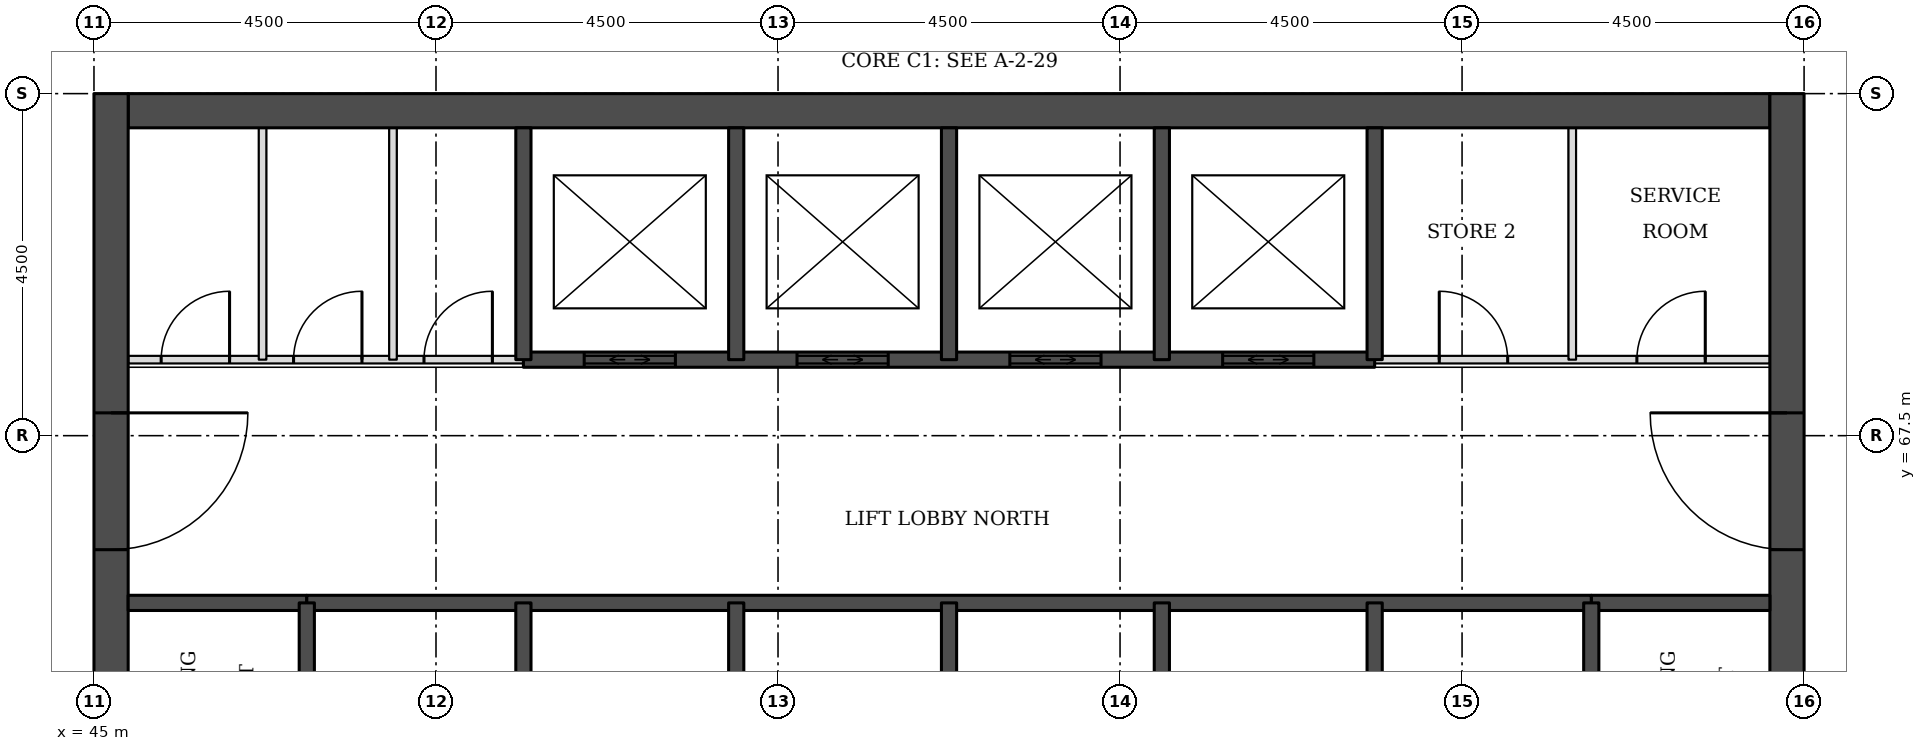
"""IFC4 building model, lengths in metres.
Left out: names, types, materials, properties, quantities, classifications, styles, units other than length and angle.
Written with IfcOpenShell. Run it as: python <this file> out.ifc"""

import sys

from ifc_helpers import new_model, si_unit, direction, frame, frame_2d, origin, place, context, subcontext, project, spatial, rectangle, extrude, element, fill, save


model = new_model("IFC4")
c1 = context("Model", 3, precision=1e-05, world=origin(), true_north=direction((0.0, 1.0)))
c2 = subcontext(c1, "Body", "Model", "MODEL_VIEW")
j1 = project(units=[si_unit("LENGTHUNIT", "METRE"), si_unit("PLANEANGLEUNIT", "RADIAN")], contexts=[c1])
p1 = place(None, origin())
s1 = spatial("IfcSite", under=j1, at=p1, CompositionType="ELEMENT")
p2 = place(p1, origin())
s2 = spatial("IfcBuilding", under=s1, at=p2, CompositionType="ELEMENT")
p3 = place(p2, frame((0.0, 0.0, 108.5)))
s3 = spatial("IfcBuildingStorey", under=s2, at=p3, CompositionType="ELEMENT", Elevation=108.5)
p4 = place(p3, frame((45.45, 71.775, 0.0), z_axis=(0.0, 0.0, 1.0), x_axis=(1.0, 0.0, 0.0)))
e1 = element("IfcWall", 1, at=p4, inside=s3, PredefinedType="SHEAR", context=c2, shape_type="SweptSolid", body=[
    extrude(rectangle(XDim=21.6, YDim=0.45, at=frame_2d((10.8, 0.0))), origin(), (0.0, 0.0, 1.0), 3.7),
])
p5 = place(p3, frame((45.225, 49.5, 0.0), z_axis=(0.0, 0.0, 1.0), x_axis=(0.0, 1.0, 0.0)))
e2 = element("IfcWall", 2, at=p5, inside=s3, PredefinedType="SHEAR", context=c2, shape_type="SweptSolid", body=[
    extrude(rectangle(XDim=22.5, YDim=0.45, at=frame_2d((11.25, 0.0))), origin(), (0.0, 0.0, 1.0), 3.7),
])
p6 = place(p5, frame((4.2, 0.0, 0.0)))
e3 = element("IfcOpeningElement", 3, at=p6, cuts=e2, PredefinedType="OPENING", context=c2, shape_type="SweptSolid", body=[
    extrude(rectangle(XDim=1.8, YDim=2.1, at=frame_2d((0.9, 1.05))), frame((0.0, 0.235, 0.0), z_axis=(0.0, -1.0, 0.0), x_axis=(1.0, 0.0, 0.0)), (0.0, 0.0, 1.0), 0.47),
])
p7 = place(p5, frame((6.9, 0.0, 0.0)))
e4 = element("IfcOpeningElement", 4, at=p7, cuts=e2, PredefinedType="OPENING", context=c2, shape_type="SweptSolid", body=[
    extrude(rectangle(XDim=1.1, YDim=2.1, at=frame_2d((0.55, 1.05))), frame((0.0, 0.235, 0.0), z_axis=(0.0, -1.0, 0.0), x_axis=(1.0, 0.0, 0.0)), (0.0, 0.0, 1.0), 0.47),
])
p8 = place(p5, frame((13.6, 0.0, 0.0)))
e5 = element("IfcOpeningElement", 5, at=p8, cuts=e2, PredefinedType="OPENING", context=c2, shape_type="SweptSolid", body=[
    extrude(rectangle(XDim=1.1, YDim=2.1, at=frame_2d((0.55, 1.05))), frame((0.0, 0.235, 0.0), z_axis=(0.0, -1.0, 0.0), x_axis=(1.0, 0.0, 0.0)), (0.0, 0.0, 1.0), 0.47),
])
p9 = place(p5, frame((16.5, 0.0, 0.0)))
e6 = element("IfcOpeningElement", 6, at=p9, cuts=e2, PredefinedType="OPENING", context=c2, shape_type="SweptSolid", body=[
    extrude(rectangle(XDim=1.8, YDim=2.1, at=frame_2d((0.9, 1.05))), frame((0.0, 0.235, 0.0), z_axis=(0.0, -1.0, 0.0), x_axis=(1.0, 0.0, 0.0)), (0.0, 0.0, 1.0), 0.47),
])
p10 = place(p3, frame((67.275, 49.5, 0.0), z_axis=(0.0, 0.0, 1.0), x_axis=(0.0, 1.0, 0.0)))
e7 = element("IfcWall", 7, at=p10, inside=s3, PredefinedType="SHEAR", context=c2, shape_type="SweptSolid", body=[
    extrude(rectangle(XDim=22.5, YDim=0.45, at=frame_2d((11.25, 0.0))), origin(), (0.0, 0.0, 1.0), 3.7),
])
p11 = place(p10, frame((4.2, 0.0, 0.0)))
e8 = element("IfcOpeningElement", 8, at=p11, cuts=e7, PredefinedType="OPENING", context=c2, shape_type="SweptSolid", body=[
    extrude(rectangle(XDim=1.8, YDim=2.1, at=frame_2d((0.9, 1.05))), frame((0.0, 0.235, 0.0), z_axis=(0.0, -1.0, 0.0), x_axis=(1.0, 0.0, 0.0)), (0.0, 0.0, 1.0), 0.47),
])
p12 = place(p10, frame((6.9, 0.0, 0.0)))
e9 = element("IfcOpeningElement", 9, at=p12, cuts=e7, PredefinedType="OPENING", context=c2, shape_type="SweptSolid", body=[
    extrude(rectangle(XDim=1.1, YDim=2.1, at=frame_2d((0.55, 1.05))), frame((0.0, 0.235, 0.0), z_axis=(0.0, -1.0, 0.0), x_axis=(1.0, 0.0, 0.0)), (0.0, 0.0, 1.0), 0.47),
])
p13 = place(p10, frame((13.6, 0.0, 0.0)))
e10 = element("IfcOpeningElement", 10, at=p13, cuts=e7, PredefinedType="OPENING", context=c2, shape_type="SweptSolid", body=[
    extrude(rectangle(XDim=1.1, YDim=2.1, at=frame_2d((0.55, 1.05))), frame((0.0, 0.235, 0.0), z_axis=(0.0, -1.0, 0.0), x_axis=(1.0, 0.0, 0.0)), (0.0, 0.0, 1.0), 0.47),
])
p14 = place(p10, frame((16.5, 0.0, 0.0)))
e11 = element("IfcOpeningElement", 11, at=p14, cuts=e7, PredefinedType="OPENING", context=c2, shape_type="SweptSolid", body=[
    extrude(rectangle(XDim=1.8, YDim=2.1, at=frame_2d((0.9, 1.05))), frame((0.0, 0.235, 0.0), z_axis=(0.0, -1.0, 0.0), x_axis=(1.0, 0.0, 0.0)), (0.0, 0.0, 1.0), 0.47),
])
for number, where, z_axis, x_axis in (
    (12, (45.45, 65.3, 0.0), (0.0, 0.0, 1.0), (1.0, 0.0, 0.0)),
    (13, (64.7, 65.3, 0.0), (0.0, 0.0, 1.0), (1.0, 0.0, 0.0)),
):
    element("IfcWall", number, at=place(p3, frame(where, z_axis=z_axis, x_axis=x_axis)), inside=s3, PredefinedType="SOLIDWALL", context=c2, shape_type="SweptSolid", body=[
        extrude(rectangle(XDim=2.35, YDim=0.2, at=frame_2d((1.175, 0.0))), origin(), (0.0, 0.0, 1.0), 3.55),
    ])
p15 = place(p3, frame((47.8, 65.3, 0.0), z_axis=(0.0, 0.0, 1.0), x_axis=(1.0, 0.0, 0.0)))
e14 = element("IfcWall", 14, at=p15, inside=s3, PredefinedType="SOLIDWALL", context=c2, shape_type="SweptSolid", body=[
    extrude(rectangle(XDim=16.9, YDim=0.2, at=frame_2d((8.45, 0.0))), origin(), (0.0, 0.0, 1.0), 3.55),
])
p16 = place(p3, frame((45.45, 68.5, 0.0), z_axis=(0.0, 0.0, 1.0), x_axis=(1.0, 0.0, 0.0)))
e15 = element("IfcWall", 15, at=p16, inside=s3, PredefinedType="PARTITIONING", context=c2, shape_type="SweptSolid", body=[
    extrude(rectangle(XDim=5.2, YDim=0.1, at=frame_2d((2.6, 0.0))), origin(), (0.0, 0.0, 1.0), 3.55),
])
p17 = place(p16, frame((0.434, 0.0, 0.0)))
e16 = element("IfcOpeningElement", 16, at=p17, cuts=e15, PredefinedType="OPENING", context=c2, shape_type="SweptSolid", body=[
    extrude(rectangle(XDim=0.9, YDim=2.1, at=frame_2d((0.45, 1.05))), frame((0.0, 0.06, 0.0), z_axis=(0.0, -1.0, 0.0), x_axis=(1.0, 0.0, 0.0)), (0.0, 0.0, 1.0), 0.12),
])
p18 = place(p16, frame((2.176, 0.0, 0.0)))
e17 = element("IfcOpeningElement", 17, at=p18, cuts=e15, PredefinedType="OPENING", context=c2, shape_type="SweptSolid", body=[
    extrude(rectangle(XDim=0.9, YDim=2.1, at=frame_2d((0.45, 1.05))), frame((0.0, 0.06, 0.0), z_axis=(0.0, -1.0, 0.0), x_axis=(1.0, 0.0, 0.0)), (0.0, 0.0, 1.0), 0.12),
])
p19 = place(p16, frame((3.892, 0.0, 0.0)))
e18 = element("IfcOpeningElement", 18, at=p19, cuts=e15, PredefinedType="OPENING", context=c2, shape_type="SweptSolid", body=[
    extrude(rectangle(XDim=0.9, YDim=2.1, at=frame_2d((0.45, 1.05))), frame((0.0, 0.06, 0.0), z_axis=(0.0, -1.0, 0.0), x_axis=(1.0, 0.0, 0.0)), (0.0, 0.0, 1.0), 0.12),
])
p20 = place(p3, frame((61.85, 68.5, 0.0), z_axis=(0.0, 0.0, 1.0), x_axis=(1.0, 0.0, 0.0)))
e19 = element("IfcWall", 19, at=p20, inside=s3, PredefinedType="PARTITIONING", context=c2, shape_type="SweptSolid", body=[
    extrude(rectangle(XDim=5.2, YDim=0.1, at=frame_2d((2.6, 0.0))), origin(), (0.0, 0.0, 1.0), 3.55),
])
p21 = place(p20, frame((3.45, 0.0, 0.0)))
e20 = element("IfcOpeningElement", 20, at=p21, cuts=e19, PredefinedType="OPENING", context=c2, shape_type="SweptSolid", body=[
    extrude(rectangle(XDim=0.9, YDim=2.1, at=frame_2d((0.45, 1.05))), frame((0.0, 0.06, 0.0), z_axis=(0.0, -1.0, 0.0), x_axis=(1.0, 0.0, 0.0)), (0.0, 0.0, 1.0), 0.12),
])
p22 = place(p20, frame((0.85, 0.0, 0.0)))
e21 = element("IfcOpeningElement", 21, at=p22, cuts=e19, PredefinedType="OPENING", context=c2, shape_type="SweptSolid", body=[
    extrude(rectangle(XDim=0.9, YDim=2.1, at=frame_2d((0.45, 1.05))), frame((0.0, 0.06, 0.0), z_axis=(0.0, -1.0, 0.0), x_axis=(1.0, 0.0, 0.0)), (0.0, 0.0, 1.0), 0.12),
])
p23 = place(p3, frame((50.65, 68.5, 0.0), z_axis=(0.0, 0.0, 1.0), x_axis=(1.0, 0.0, 0.0)))
e22 = element("IfcWall", 22, at=p23, inside=s3, PredefinedType="SOLIDWALL", context=c2, shape_type="SweptSolid", body=[
    extrude(rectangle(XDim=11.2, YDim=0.2, at=frame_2d((5.6, 0.0))), origin(), (0.0, 0.0, 1.0), 3.55),
])
p24 = place(p23, frame((0.8, 0.0, 0.0)))
e23 = element("IfcOpeningElement", 23, at=p24, cuts=e22, PredefinedType="OPENING", context=c2, shape_type="SweptSolid", body=[
    extrude(rectangle(XDim=1.2, YDim=2.1, at=frame_2d((0.6, 1.05))), frame((0.0, 0.11, 0.0), z_axis=(0.0, -1.0, 0.0), x_axis=(1.0, 0.0, 0.0)), (0.0, 0.0, 1.0), 0.22),
])
p25 = place(p23, frame((3.6, 0.0, 0.0)))
e24 = element("IfcOpeningElement", 24, at=p25, cuts=e22, PredefinedType="OPENING", context=c2, shape_type="SweptSolid", body=[
    extrude(rectangle(XDim=1.2, YDim=2.1, at=frame_2d((0.6, 1.05))), frame((0.0, 0.11, 0.0), z_axis=(0.0, -1.0, 0.0), x_axis=(1.0, 0.0, 0.0)), (0.0, 0.0, 1.0), 0.22),
])
p26 = place(p23, frame((6.4, 0.0, 0.0)))
e25 = element("IfcOpeningElement", 25, at=p26, cuts=e22, PredefinedType="OPENING", context=c2, shape_type="SweptSolid", body=[
    extrude(rectangle(XDim=1.2, YDim=2.1, at=frame_2d((0.6, 1.05))), frame((0.0, 0.11, 0.0), z_axis=(0.0, -1.0, 0.0), x_axis=(1.0, 0.0, 0.0)), (0.0, 0.0, 1.0), 0.22),
])
p27 = place(p23, frame((9.2, 0.0, 0.0)))
e26 = element("IfcOpeningElement", 26, at=p27, cuts=e22, PredefinedType="OPENING", context=c2, shape_type="SweptSolid", body=[
    extrude(rectangle(XDim=1.2, YDim=2.1, at=frame_2d((0.6, 1.05))), frame((0.0, 0.11, 0.0), z_axis=(0.0, -1.0, 0.0), x_axis=(1.0, 0.0, 0.0)), (0.0, 0.0, 1.0), 0.22),
])
p28 = place(p3, frame((47.218, 68.5, 0.0), z_axis=(0.0, 0.0, 1.0), x_axis=(0.0, 1.0, 0.0)))
e27 = element("IfcWall", 27, at=p28, inside=s3, PredefinedType="PARTITIONING", context=c2, shape_type="SweptSolid", body=[
    extrude(rectangle(XDim=3.05, YDim=0.1, at=frame_2d((1.525, 0.0))), origin(), (0.0, 0.0, 1.0), 3.55),
])
p29 = place(p3, frame((47.8, 62.0, 0.0), z_axis=(0.0, 0.0, 1.0), x_axis=(0.0, 1.0, 0.0)))
e28 = element("IfcWall", 28, at=p29, inside=s3, PredefinedType="SOLIDWALL", context=c2, shape_type="SweptSolid", body=[
    extrude(rectangle(XDim=3.3, YDim=0.2, at=frame_2d((1.65, 0.0))), origin(), (0.0, 0.0, 1.0), 3.55),
])
p30 = place(p29, frame((1.1, 0.0, 0.0)))
e29 = element("IfcOpeningElement", 29, at=p30, cuts=e28, PredefinedType="OPENING", context=c2, shape_type="SweptSolid", body=[
    extrude(rectangle(XDim=1.1, YDim=2.1, at=frame_2d((0.55, 1.05))), frame((0.0, 0.11, 0.0), z_axis=(0.0, -1.0, 0.0), x_axis=(1.0, 0.0, 0.0)), (0.0, 0.0, 1.0), 0.22),
])
p31 = place(p3, frame((48.934, 68.5, 0.0), z_axis=(0.0, 0.0, 1.0), x_axis=(0.0, 1.0, 0.0)))
e30 = element("IfcWall", 30, at=p31, inside=s3, PredefinedType="PARTITIONING", context=c2, shape_type="SweptSolid", body=[
    extrude(rectangle(XDim=3.05, YDim=0.1, at=frame_2d((1.525, 0.0))), origin(), (0.0, 0.0, 1.0), 3.55),
])
p32 = place(p3, frame((50.65, 62.0, 0.0), z_axis=(0.0, 0.0, 1.0), x_axis=(0.0, 1.0, 0.0)))
e31 = element("IfcWall", 31, at=p32, inside=s3, PredefinedType="SOLIDWALL", context=c2, shape_type="SweptSolid", body=[
    extrude(rectangle(XDim=3.3, YDim=0.2, at=frame_2d((1.65, 0.0))), origin(), (0.0, 0.0, 1.0), 3.55),
])
p33 = place(p3, frame((50.65, 68.5, 0.0), z_axis=(0.0, 0.0, 1.0), x_axis=(0.0, 1.0, 0.0)))
e32 = element("IfcWall", 32, at=p33, inside=s3, PredefinedType="SOLIDWALL", context=c2, shape_type="SweptSolid", body=[
    extrude(rectangle(XDim=3.05, YDim=0.2, at=frame_2d((1.525, 0.0))), origin(), (0.0, 0.0, 1.0), 3.55),
])
p34 = place(p3, frame((53.45, 62.5, 0.0), z_axis=(0.0, 0.0, 1.0), x_axis=(0.0, 1.0, 0.0)))
e33 = element("IfcWall", 33, at=p34, inside=s3, PredefinedType="SOLIDWALL", context=c2, shape_type="SweptSolid", body=[
    extrude(rectangle(XDim=2.8, YDim=0.2, at=frame_2d((1.4, 0.0))), origin(), (0.0, 0.0, 1.0), 3.55),
])
p35 = place(p3, frame((53.45, 68.5, 0.0), z_axis=(0.0, 0.0, 1.0), x_axis=(0.0, 1.0, 0.0)))
e34 = element("IfcWall", 34, at=p35, inside=s3, PredefinedType="SOLIDWALL", context=c2, shape_type="SweptSolid", body=[
    extrude(rectangle(XDim=3.05, YDim=0.2, at=frame_2d((1.525, 0.0))), origin(), (0.0, 0.0, 1.0), 3.55),
])
p36 = place(p3, frame((56.25, 62.5, 0.0), z_axis=(0.0, 0.0, 1.0), x_axis=(0.0, 1.0, 0.0)))
e35 = element("IfcWall", 35, at=p36, inside=s3, PredefinedType="SOLIDWALL", context=c2, shape_type="SweptSolid", body=[
    extrude(rectangle(XDim=2.8, YDim=0.2, at=frame_2d((1.4, 0.0))), origin(), (0.0, 0.0, 1.0), 3.55),
])
p37 = place(p3, frame((56.25, 68.5, 0.0), z_axis=(0.0, 0.0, 1.0), x_axis=(0.0, 1.0, 0.0)))
e36 = element("IfcWall", 36, at=p37, inside=s3, PredefinedType="SOLIDWALL", context=c2, shape_type="SweptSolid", body=[
    extrude(rectangle(XDim=3.05, YDim=0.2, at=frame_2d((1.525, 0.0))), origin(), (0.0, 0.0, 1.0), 3.55),
])
p38 = place(p3, frame((59.05, 62.5, 0.0), z_axis=(0.0, 0.0, 1.0), x_axis=(0.0, 1.0, 0.0)))
e37 = element("IfcWall", 37, at=p38, inside=s3, PredefinedType="SOLIDWALL", context=c2, shape_type="SweptSolid", body=[
    extrude(rectangle(XDim=2.8, YDim=0.2, at=frame_2d((1.4, 0.0))), origin(), (0.0, 0.0, 1.0), 3.55),
])
p39 = place(p3, frame((59.05, 68.5, 0.0), z_axis=(0.0, 0.0, 1.0), x_axis=(0.0, 1.0, 0.0)))
e38 = element("IfcWall", 38, at=p39, inside=s3, PredefinedType="SOLIDWALL", context=c2, shape_type="SweptSolid", body=[
    extrude(rectangle(XDim=3.05, YDim=0.2, at=frame_2d((1.525, 0.0))), origin(), (0.0, 0.0, 1.0), 3.55),
])
p40 = place(p3, frame((61.85, 62.0, 0.0), z_axis=(0.0, 0.0, 1.0), x_axis=(0.0, 1.0, 0.0)))
e39 = element("IfcWall", 39, at=p40, inside=s3, PredefinedType="SOLIDWALL", context=c2, shape_type="SweptSolid", body=[
    extrude(rectangle(XDim=3.3, YDim=0.2, at=frame_2d((1.65, 0.0))), origin(), (0.0, 0.0, 1.0), 3.55),
])
p41 = place(p3, frame((61.85, 68.5, 0.0), z_axis=(0.0, 0.0, 1.0), x_axis=(0.0, 1.0, 0.0)))
e40 = element("IfcWall", 40, at=p41, inside=s3, PredefinedType="SOLIDWALL", context=c2, shape_type="SweptSolid", body=[
    extrude(rectangle(XDim=3.05, YDim=0.2, at=frame_2d((1.525, 0.0))), origin(), (0.0, 0.0, 1.0), 3.55),
])
p42 = place(p3, frame((64.45, 68.5, 0.0), z_axis=(0.0, 0.0, 1.0), x_axis=(0.0, 1.0, 0.0)))
e41 = element("IfcWall", 41, at=p42, inside=s3, PredefinedType="PARTITIONING", context=c2, shape_type="SweptSolid", body=[
    extrude(rectangle(XDim=3.05, YDim=0.1, at=frame_2d((1.525, 0.0))), origin(), (0.0, 0.0, 1.0), 3.55),
])
p43 = place(p3, frame((64.7, 62.0, 0.0), z_axis=(0.0, 0.0, 1.0), x_axis=(0.0, 1.0, 0.0)))
e42 = element("IfcWall", 42, at=p43, inside=s3, PredefinedType="SOLIDWALL", context=c2, shape_type="SweptSolid", body=[
    extrude(rectangle(XDim=3.3, YDim=0.2, at=frame_2d((1.65, 0.0))), origin(), (0.0, 0.0, 1.0), 3.55),
])
p44 = place(p43, frame((1.1, 0.0, 0.0)))
e43 = element("IfcOpeningElement", 43, at=p44, cuts=e42, PredefinedType="OPENING", context=c2, shape_type="SweptSolid", body=[
    extrude(rectangle(XDim=1.1, YDim=2.1, at=frame_2d((0.55, 1.05))), frame((0.0, 0.11, 0.0), z_axis=(0.0, -1.0, 0.0), x_axis=(1.0, 0.0, 0.0)), (0.0, 0.0, 1.0), 0.22),
])
p45 = place(p24, origin())
e44 = element("IfcDoor", 44, at=p45, inside=s3, OperationType="DOUBLE_DOOR_SLIDING", PredefinedType="DOOR", context=c2, shape_type="SweptSolid", body=[
    extrude(rectangle(XDim=1.2, YDim=2.1, at=frame_2d((0.6, 1.05))), frame((0.0, 0.025, 0.0), z_axis=(0.0, -1.0, 0.0), x_axis=(1.0, 0.0, 0.0)), (0.0, 0.0, 1.0), 0.05),
])
fill(e23, e44)
p46 = place(p25, origin())
e45 = element("IfcDoor", 45, at=p46, inside=s3, OperationType="DOUBLE_DOOR_SLIDING", PredefinedType="DOOR", context=c2, shape_type="SweptSolid", body=[
    extrude(rectangle(XDim=1.2, YDim=2.1, at=frame_2d((0.6, 1.05))), frame((0.0, 0.025, 0.0), z_axis=(0.0, -1.0, 0.0), x_axis=(1.0, 0.0, 0.0)), (0.0, 0.0, 1.0), 0.05),
])
fill(e24, e45)
p47 = place(p26, origin())
e46 = element("IfcDoor", 46, at=p47, inside=s3, OperationType="DOUBLE_DOOR_SLIDING", PredefinedType="DOOR", context=c2, shape_type="SweptSolid", body=[
    extrude(rectangle(XDim=1.2, YDim=2.1, at=frame_2d((0.6, 1.05))), frame((0.0, 0.025, 0.0), z_axis=(0.0, -1.0, 0.0), x_axis=(1.0, 0.0, 0.0)), (0.0, 0.0, 1.0), 0.05),
])
fill(e25, e46)
p48 = place(p27, origin())
e47 = element("IfcDoor", 47, at=p48, inside=s3, OperationType="DOUBLE_DOOR_SLIDING", PredefinedType="DOOR", context=c2, shape_type="SweptSolid", body=[
    extrude(rectangle(XDim=1.2, YDim=2.1, at=frame_2d((0.6, 1.05))), frame((0.0, 0.025, 0.0), z_axis=(0.0, -1.0, 0.0), x_axis=(1.0, 0.0, 0.0)), (0.0, 0.0, 1.0), 0.05),
])
fill(e26, e47)
p49 = place(p9, frame((1.8, 0.0, 0.0), z_axis=(0.0, 0.0, 1.0), x_axis=(-1.0, 0.0, 0.0)))
e48 = element("IfcDoor", 48, at=p49, inside=s3, OperationType="SINGLE_SWING_LEFT", PredefinedType="DOOR", context=c2, shape_type="SweptSolid", body=[
    extrude(rectangle(XDim=1.8, YDim=2.1, at=frame_2d((0.9, 1.05))), frame((0.0, 0.025, 0.0), z_axis=(0.0, -1.0, 0.0), x_axis=(1.0, 0.0, 0.0)), (0.0, 0.0, 1.0), 0.05),
])
fill(e6, e48)
p50 = place(p14, origin())
e49 = element("IfcDoor", 49, at=p50, inside=s3, OperationType="SINGLE_SWING_RIGHT", PredefinedType="DOOR", context=c2, shape_type="SweptSolid", body=[
    extrude(rectangle(XDim=1.8, YDim=2.1, at=frame_2d((0.9, 1.05))), frame((0.0, 0.025, 0.0), z_axis=(0.0, -1.0, 0.0), x_axis=(1.0, 0.0, 0.0)), (0.0, 0.0, 1.0), 0.05),
])
fill(e11, e49)
p51 = place(p21, origin())
e50 = element("IfcDoor", 50, at=p51, inside=s3, OperationType="SINGLE_SWING_RIGHT", PredefinedType="DOOR", context=c2, shape_type="SweptSolid", body=[
    extrude(rectangle(XDim=0.9, YDim=2.1, at=frame_2d((0.45, 1.05))), frame((0.0, 0.025, 0.0), z_axis=(0.0, -1.0, 0.0), x_axis=(1.0, 0.0, 0.0)), (0.0, 0.0, 1.0), 0.05),
])
fill(e20, e50)
p52 = place(p22, origin())
e51 = element("IfcDoor", 51, at=p52, inside=s3, OperationType="SINGLE_SWING_LEFT", PredefinedType="DOOR", context=c2, shape_type="SweptSolid", body=[
    extrude(rectangle(XDim=0.9, YDim=2.1, at=frame_2d((0.45, 1.05))), frame((0.0, 0.025, 0.0), z_axis=(0.0, -1.0, 0.0), x_axis=(1.0, 0.0, 0.0)), (0.0, 0.0, 1.0), 0.05),
])
fill(e21, e51)
p53 = place(p17, origin())
e52 = element("IfcDoor", 52, at=p53, inside=s3, OperationType="SINGLE_SWING_RIGHT", PredefinedType="DOOR", context=c2, shape_type="SweptSolid", body=[
    extrude(rectangle(XDim=0.9, YDim=2.1, at=frame_2d((0.45, 1.05))), frame((0.0, 0.025, 0.0), z_axis=(0.0, -1.0, 0.0), x_axis=(1.0, 0.0, 0.0)), (0.0, 0.0, 1.0), 0.05),
])
fill(e16, e52)
p54 = place(p18, origin())
e53 = element("IfcDoor", 53, at=p54, inside=s3, OperationType="SINGLE_SWING_RIGHT", PredefinedType="DOOR", context=c2, shape_type="SweptSolid", body=[
    extrude(rectangle(XDim=0.9, YDim=2.1, at=frame_2d((0.45, 1.05))), frame((0.0, 0.025, 0.0), z_axis=(0.0, -1.0, 0.0), x_axis=(1.0, 0.0, 0.0)), (0.0, 0.0, 1.0), 0.05),
])
fill(e17, e53)
p55 = place(p19, origin())
e54 = element("IfcDoor", 54, at=p55, inside=s3, OperationType="SINGLE_SWING_RIGHT", PredefinedType="DOOR", context=c2, shape_type="SweptSolid", body=[
    extrude(rectangle(XDim=0.9, YDim=2.1, at=frame_2d((0.45, 1.05))), frame((0.0, 0.025, 0.0), z_axis=(0.0, -1.0, 0.0), x_axis=(1.0, 0.0, 0.0)), (0.0, 0.0, 1.0), 0.05),
])
fill(e18, e54)
save(model, sys.argv[1])
